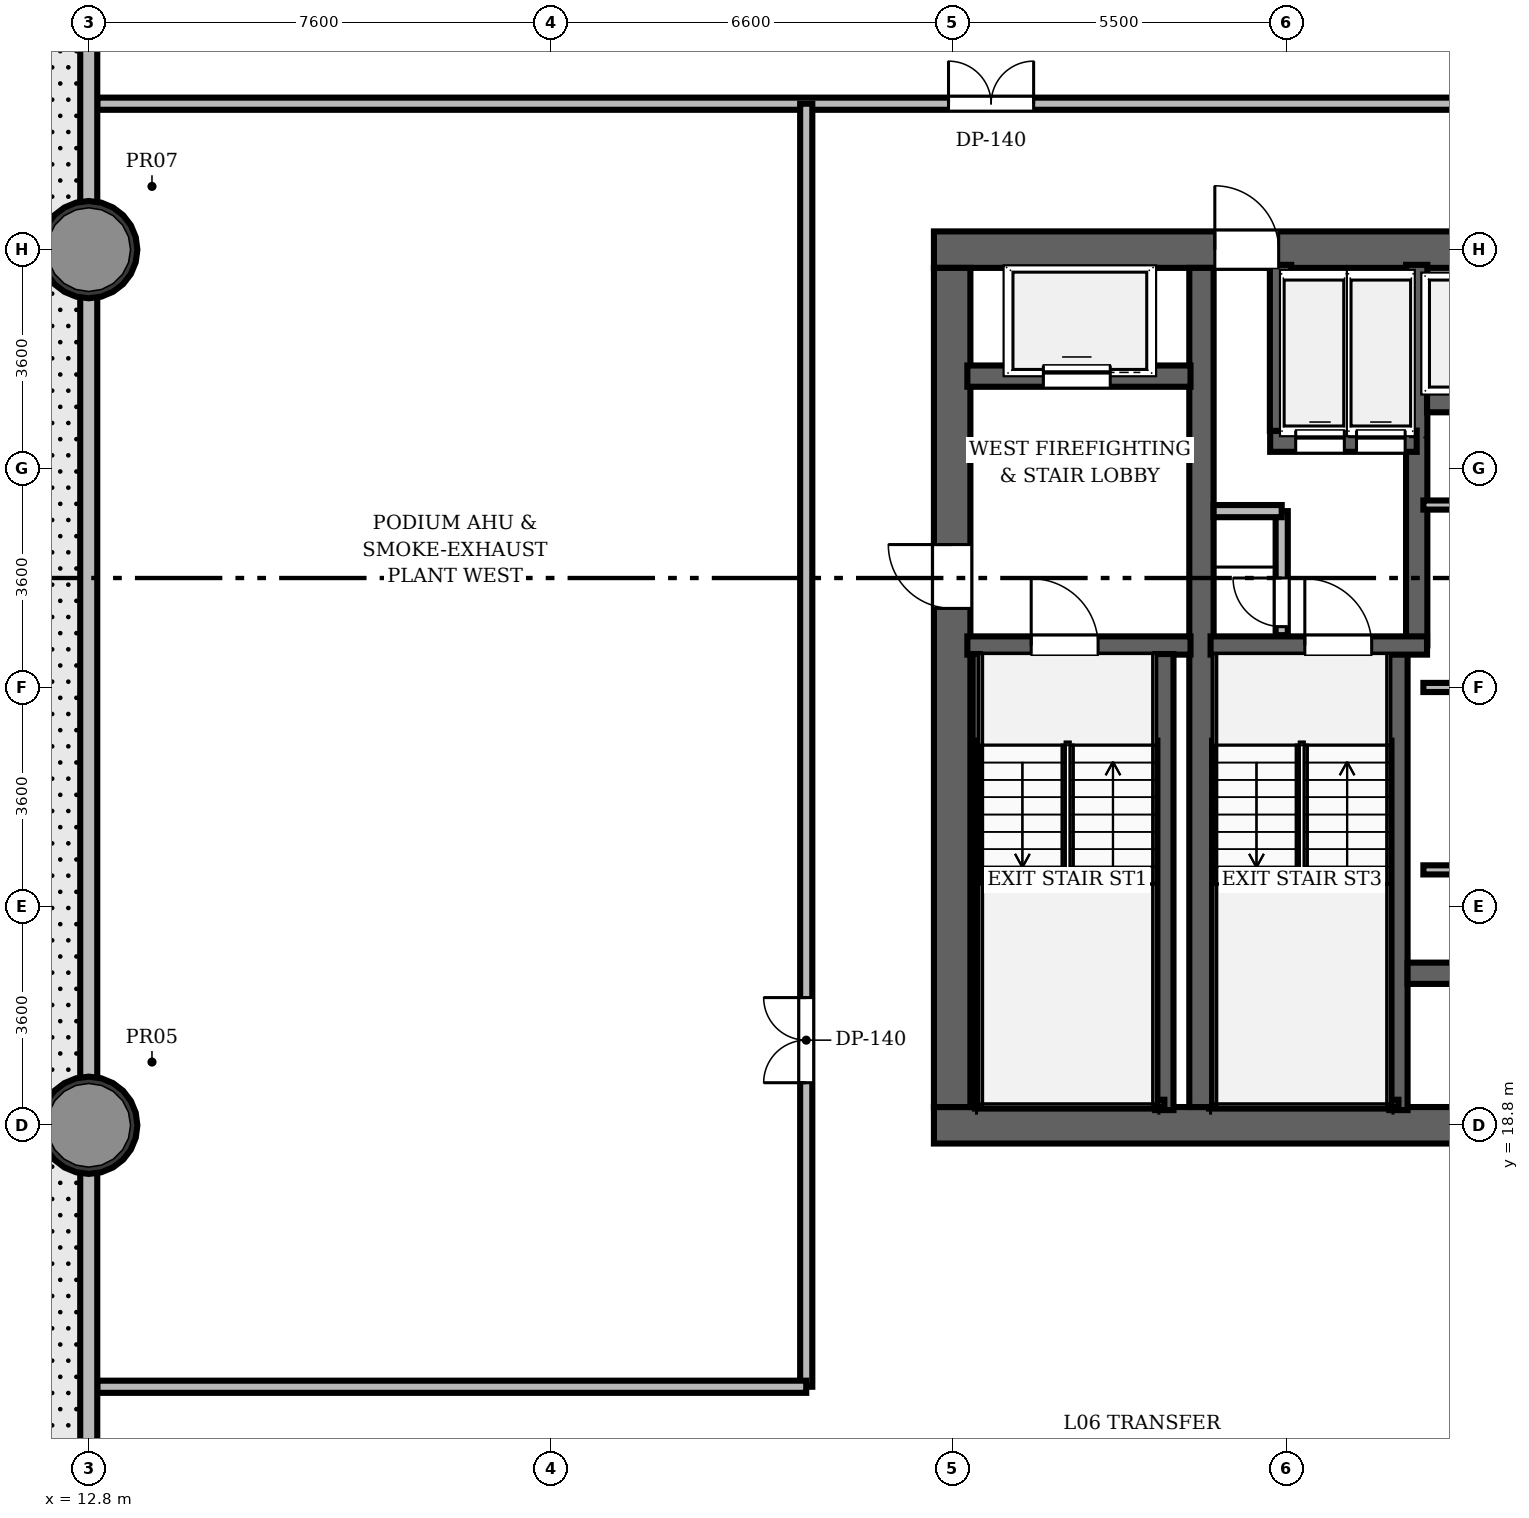
"""IFC4 building model, lengths in metres.
Left out: names, types, materials, properties, quantities, classifications, styles, units other than length and angle.
Written with IfcOpenShell. Run it as: python <this file> out.ifc"""

import sys

from ifc_helpers import new_model, si_unit, direction, frame, frame_2d, origin, origin_2d, place, context, subcontext, project, spatial, rectangle, hollow_circle, extrude, element, fill, save


model = new_model("IFC4")
c1 = context("Model", 3, precision=1e-05, world=origin(), true_north=direction((0.0, 1.0)))
c2 = subcontext(c1, "Body", "Model", "MODEL_VIEW")
j1 = project(units=[si_unit("LENGTHUNIT", "METRE"), si_unit("PLANEANGLEUNIT", "RADIAN")], contexts=[c1])
p1 = place(None, origin())
s1 = spatial("IfcSite", under=j1, at=p1, CompositionType="ELEMENT")
p2 = place(p1, origin())
s2 = spatial("IfcBuilding", under=s1, at=p2, CompositionType="ELEMENT")
p3 = place(p2, frame((0.0, 0.0, 35.4)))
s3 = spatial("IfcBuildingStorey", under=s2, at=p3, CompositionType="ELEMENT", Elevation=35.4)
p4 = place(p3, frame((26.7, 18.8, 0.0), z_axis=(0.0, 0.0, 1.0), x_axis=(1.0, 0.0, 0.0)))
e1 = element("IfcWall", 1, at=p4, inside=s3, PredefinedType="SHEAR", context=c2, shape_type="SweptSolid", body=[
    extrude(rectangle(XDim=22.6, YDim=0.6, at=frame_2d((11.3, 0.0))), origin(), (0.0, 0.0, 1.0), 6.0),
])
p5 = place(p4, frame((14.52, 0.0, 0.0)))
e2 = element("IfcOpeningElement", 2, at=p5, cuts=e1, PredefinedType="OPENING", context=c2, shape_type="SweptSolid", body=[
    extrude(rectangle(XDim=1.05, YDim=2.15, at=frame_2d((0.525, 1.075))), frame((0.0, 0.31, 0.0), z_axis=(0.0, -1.0, 0.0), x_axis=(1.0, 0.0, 0.0)), (0.0, 0.0, 1.0), 0.62),
])
p6 = place(p3, frame((26.7, 33.2, 0.0), z_axis=(0.0, 0.0, 1.0), x_axis=(1.0, 0.0, 0.0)))
e3 = element("IfcWall", 3, at=p6, inside=s3, PredefinedType="SHEAR", context=c2, shape_type="SweptSolid", body=[
    extrude(rectangle(XDim=22.6, YDim=0.6, at=frame_2d((11.3, 0.0))), origin(), (0.0, 0.0, 1.0), 6.0),
])
p7 = place(p6, frame((4.62, 0.0, 0.0)))
e4 = element("IfcOpeningElement", 4, at=p7, cuts=e3, PredefinedType="OPENING", context=c2, shape_type="SweptSolid", body=[
    extrude(rectangle(XDim=1.05, YDim=2.15, at=frame_2d((0.525, 1.075))), frame((0.0, 0.31, 0.0), z_axis=(0.0, -1.0, 0.0), x_axis=(1.0, 0.0, 0.0)), (0.0, 0.0, 1.0), 0.62),
])
p8 = place(p6, frame((14.52, 0.0, 0.0)))
e5 = element("IfcOpeningElement", 5, at=p8, cuts=e3, PredefinedType="OPENING", context=c2, shape_type="SweptSolid", body=[
    extrude(rectangle(XDim=1.05, YDim=2.15, at=frame_2d((0.525, 1.075))), frame((0.0, 0.31, 0.0), z_axis=(0.0, -1.0, 0.0), x_axis=(1.0, 0.0, 0.0)), (0.0, 0.0, 1.0), 0.62),
])
p9 = place(p3, frame((27.0, 19.1, 0.0), z_axis=(0.0, 0.0, 1.0), x_axis=(0.0, 1.0, 0.0)))
e6 = element("IfcWall", 6, at=p9, inside=s3, PredefinedType="SHEAR", context=c2, shape_type="SweptSolid", body=[
    extrude(rectangle(XDim=13.8, YDim=0.6, at=frame_2d((6.9, 0.0))), origin(), (0.0, 0.0, 1.0), 6.0),
])
p10 = place(p9, frame((8.2, 0.0, 0.0)))
e7 = element("IfcOpeningElement", 7, at=p10, cuts=e6, PredefinedType="OPENING", context=c2, shape_type="SweptSolid", body=[
    extrude(rectangle(XDim=1.05, YDim=2.15, at=frame_2d((0.525, 1.075))), frame((0.0, 0.31, 0.0), z_axis=(0.0, -1.0, 0.0), x_axis=(1.0, 0.0, 0.0)), (0.0, 0.0, 1.0), 0.62),
])
p11 = place(p3, frame((31.1, 19.1, 0.0), z_axis=(0.0, 0.0, 1.0), x_axis=(0.0, 1.0, 0.0)))
e8 = element("IfcWall", 8, at=p11, inside=s3, PredefinedType="SHEAR", context=c2, shape_type="SweptSolid", body=[
    extrude(rectangle(XDim=13.8, YDim=0.4, at=frame_2d((6.9, 0.0))), origin(), (0.0, 0.0, 1.0), 6.0),
])
for number, where, z_axis, x_axis in (
    (9, (12.8, 18.8, 0.0), (0.0, 0.0, 1.0), (1.0, 0.0, 0.0)),
    (10, (12.8, 33.2, 0.0), (0.0, 0.0, 1.0), (1.0, 0.0, 0.0)),
):
    element("IfcColumn", number, at=place(p3, frame(where, z_axis=z_axis, x_axis=x_axis)), inside=s3, PredefinedType="COLUMN", context=c2, shape_type="SweptSolid", body=[
        extrude(hollow_circle(Radius=0.8, WallThickness=0.06, at=origin_2d()), origin(), (0.0, 0.0, 1.0), 6.0),
    ])
p12 = place(p3, frame((27.25, 26.69, 0.0), z_axis=(0.0, 0.0, 1.0), x_axis=(1.0, 0.0, 0.0)))
e11 = element("IfcWall", 11, at=p12, inside=s3, PredefinedType="SHEAR", context=c2, shape_type="SweptSolid", body=[
    extrude(rectangle(XDim=3.67, YDim=0.3, at=frame_2d((1.835, 0.0))), origin(), (0.0, 0.0, 1.0), 6.0),
])
p13 = place(p12, frame((1.05, 0.0, 0.0)))
e12 = element("IfcOpeningElement", 12, at=p13, cuts=e11, PredefinedType="OPENING", context=c2, shape_type="SweptSolid", body=[
    extrude(rectangle(XDim=1.1, YDim=2.15, at=frame_2d((0.55, 1.075))), frame((0.0, 0.16, 0.0), z_axis=(0.0, -1.0, 0.0), x_axis=(1.0, 0.0, 0.0)), (0.0, 0.0, 1.0), 0.32),
])
p14 = place(p3, frame((30.49, 19.05, 0.0), z_axis=(0.0, 0.0, 1.0), x_axis=(0.0, 1.0, 0.0)))
e13 = element("IfcWall", 13, at=p14, inside=s3, PredefinedType="SHEAR", context=c2, shape_type="SweptSolid", body=[
    extrude(rectangle(XDim=7.5, YDim=0.3, at=frame_2d((3.75, 0.0))), origin(), (0.0, 0.0, 1.0), 6.0),
])
p15 = place(p3, frame((27.395, 19.1, 0.0), z_axis=(0.0, 0.0, 1.0), x_axis=(0.0, 1.0, 0.0)))
e14 = element("IfcWall", 14, at=p15, inside=s3, PredefinedType="SHEAR", context=c2, shape_type="SweptSolid", body=[
    extrude(rectangle(XDim=7.45, YDim=0.12, at=frame_2d((3.725, 0.0))), origin(), (0.0, 0.0, 1.0), 6.0),
])
p16 = place(p3, frame((27.395, 19.16, 0.0), z_axis=(0.0, 0.0, 1.0), x_axis=(1.0, 0.0, 0.0)))
e15 = element("IfcWall", 15, at=p16, inside=s3, PredefinedType="SHEAR", context=c2, shape_type="SweptSolid", body=[
    extrude(rectangle(XDim=3.095, YDim=0.12, at=frame_2d((1.547, 0.0))), origin(), (0.0, 0.0, 1.0), 6.0),
])
p17 = place(p3, frame((27.25, 31.12, 0.0), z_axis=(0.0, 0.0, 1.0), x_axis=(1.0, 0.0, 0.0)))
e16 = element("IfcWall", 16, at=p17, inside=s3, PredefinedType="SHEAR", context=c2, shape_type="SweptSolid", body=[
    extrude(rectangle(XDim=3.67, YDim=0.35, at=frame_2d((1.835, 0.0))), origin(), (0.0, 0.0, 1.0), 4.81),
])
p18 = place(p17, frame((1.25, 0.0, 0.0)))
e17 = element("IfcOpeningElement", 17, at=p18, cuts=e16, PredefinedType="OPENING", context=c2, shape_type="SweptSolid", body=[
    extrude(rectangle(XDim=1.1, YDim=2.15, at=frame_2d((0.55, 1.075))), frame((0.0, 0.185, 0.0), z_axis=(0.0, -1.0, 0.0), x_axis=(1.0, 0.0, 0.0)), (0.0, 0.0, 1.0), 0.37),
])
p19 = place(p3, frame((34.34, 19.05, 0.0), z_axis=(0.0, 0.0, 1.0), x_axis=(0.0, 1.0, 0.0)))
e18 = element("IfcWall", 18, at=p19, inside=s3, PredefinedType="SHEAR", context=c2, shape_type="SweptSolid", body=[
    extrude(rectangle(XDim=7.5, YDim=0.3, at=frame_2d((3.75, 0.0))), origin(), (0.0, 0.0, 1.0), 6.0),
])
p20 = place(p3, frame((34.64, 26.69, 0.0), z_axis=(0.0, 0.0, 1.0), x_axis=(0.0, 1.0, 0.0)))
e19 = element("IfcWall", 19, at=p20, inside=s3, PredefinedType="SHEAR", context=c2, shape_type="SweptSolid", body=[
    extrude(rectangle(XDim=6.26, YDim=0.35, at=frame_2d((3.13, 0.0))), origin(), (0.0, 0.0, 1.0), 6.0),
])
p21 = place(p3, frame((31.25, 26.69, 0.0), z_axis=(0.0, 0.0, 1.0), x_axis=(1.0, 0.0, 0.0)))
e20 = element("IfcWall", 20, at=p21, inside=s3, PredefinedType="SHEAR", context=c2, shape_type="SweptSolid", body=[
    extrude(rectangle(XDim=3.56, YDim=0.3, at=frame_2d((1.78, 0.0))), origin(), (0.0, 0.0, 1.0), 6.0),
])
p22 = place(p21, frame((1.55, 0.0, 0.0)))
e21 = element("IfcOpeningElement", 21, at=p22, cuts=e20, PredefinedType="OPENING", context=c2, shape_type="SweptSolid", body=[
    extrude(rectangle(XDim=1.1, YDim=2.15, at=frame_2d((0.55, 1.075))), frame((0.0, 0.16, 0.0), z_axis=(0.0, -1.0, 0.0), x_axis=(1.0, 0.0, 0.0)), (0.0, 0.0, 1.0), 0.32),
])
p23 = place(p3, frame((31.3, 19.16, 0.0), z_axis=(0.0, 0.0, 1.0), x_axis=(1.0, 0.0, 0.0)))
e22 = element("IfcWall", 22, at=p23, inside=s3, PredefinedType="SHEAR", context=c2, shape_type="SweptSolid", body=[
    extrude(rectangle(XDim=3.04, YDim=0.12, at=frame_2d((1.52, 0.0))), origin(), (0.0, 0.0, 1.0), 6.0),
])
p24 = place(p3, frame((32.23, 30.05, 0.0), z_axis=(0.0, 0.0, 1.0), x_axis=(1.0, 0.0, 0.0)))
e23 = element("IfcWall", 23, at=p24, inside=s3, PredefinedType="SHEAR", context=c2, shape_type="SweptSolid", body=[
    extrude(rectangle(XDim=2.41, YDim=0.35, at=frame_2d((1.205, 0.0))), origin(), (0.0, 0.0, 1.0), 4.81),
])
p25 = place(p24, frame((0.42, 0.0, 0.0)))
e24 = element("IfcOpeningElement", 24, at=p25, cuts=e23, PredefinedType="OPENING", context=c2, shape_type="SweptSolid", body=[
    extrude(rectangle(XDim=0.8, YDim=2.15, at=frame_2d((0.4, 1.075))), frame((0.0, 0.185, 0.0), z_axis=(0.0, -1.0, 0.0), x_axis=(1.0, 0.0, 0.0)), (0.0, 0.0, 1.0), 0.37),
])
p26 = place(p24, frame((1.42, 0.0, 0.0)))
e25 = element("IfcOpeningElement", 25, at=p26, cuts=e23, PredefinedType="OPENING", context=c2, shape_type="SweptSolid", body=[
    extrude(rectangle(XDim=0.8, YDim=2.15, at=frame_2d((0.4, 1.075))), frame((0.0, 0.185, 0.0), z_axis=(0.0, -1.0, 0.0), x_axis=(1.0, 0.0, 0.0)), (0.0, 0.0, 1.0), 0.37),
])
p27 = place(p3, frame((32.4, 30.22, 0.0), z_axis=(0.0, 0.0, 1.0), x_axis=(0.0, 1.0, 0.0)))
e26 = element("IfcWall", 26, at=p27, inside=s3, PredefinedType="SHEAR", context=c2, shape_type="SweptSolid", body=[
    extrude(rectangle(XDim=2.73, YDim=0.35, at=frame_2d((1.365, 0.0))), origin(), (0.0, 0.0, 1.0), 4.81),
])
p28 = place(p3, frame((32.42, 26.86, 0.0), z_axis=(0.0, 0.0, 1.0), x_axis=(0.0, 1.0, 0.0)))
e27 = element("IfcWall", 27, at=p28, inside=s3, PredefinedType="PARTITIONING", context=c2, shape_type="SweptSolid", body=[
    extrude(rectangle(XDim=2.04, YDim=0.2, at=frame_2d((1.02, 0.0))), origin(), (0.0, 0.0, 1.0), 4.81),
])
p29 = place(p28, frame((0.14, 0.0, 0.0)))
e28 = element("IfcOpeningElement", 28, at=p29, cuts=e27, PredefinedType="OPENING", context=c2, shape_type="SweptSolid", body=[
    extrude(rectangle(XDim=0.8, YDim=2.05, at=frame_2d((0.4, 1.025))), frame((0.0, 0.11, 0.0), z_axis=(0.0, -1.0, 0.0), x_axis=(1.0, 0.0, 0.0)), (0.0, 0.0, 1.0), 0.22),
])
p30 = place(p3, frame((31.3, 28.9, 0.0), z_axis=(0.0, 0.0, 1.0), x_axis=(1.0, 0.0, 0.0)))
e29 = element("IfcWall", 29, at=p30, inside=s3, PredefinedType="PARTITIONING", context=c2, shape_type="SweptSolid", body=[
    extrude(rectangle(XDim=1.12, YDim=0.2, at=frame_2d((0.56, 0.0))), origin(), (0.0, 0.0, 1.0), 4.81),
])
p31 = place(p3, frame((34.81, 30.7, 0.0), z_axis=(0.0, 0.0, 1.0), x_axis=(1.0, 0.0, 0.0)))
e30 = element("IfcWall", 30, at=p31, inside=s3, PredefinedType="SHEAR", context=c2, shape_type="SweptSolid", body=[
    extrude(rectangle(XDim=6.36, YDim=0.35, at=frame_2d((3.18, 0.0))), origin(), (0.0, 0.0, 1.0), 4.81),
])
p32 = place(p31, frame((0.5, 0.0, 0.0)))
e31 = element("IfcOpeningElement", 31, at=p32, cuts=e30, PredefinedType="OPENING", context=c2, shape_type="SweptSolid", body=[
    extrude(rectangle(XDim=0.9, YDim=2.15, at=frame_2d((0.45, 1.075))), frame((0.0, 0.185, 0.0), z_axis=(0.0, -1.0, 0.0), x_axis=(1.0, 0.0, 0.0)), (0.0, 0.0, 1.0), 0.37),
])
p33 = place(p31, frame((2.58, 0.0, 0.0)))
e32 = element("IfcOpeningElement", 32, at=p33, cuts=e30, PredefinedType="OPENING", context=c2, shape_type="SweptSolid", body=[
    extrude(rectangle(XDim=0.9, YDim=2.15, at=frame_2d((0.45, 1.075))), frame((0.0, 0.185, 0.0), z_axis=(0.0, -1.0, 0.0), x_axis=(1.0, 0.0, 0.0)), (0.0, 0.0, 1.0), 0.37),
])
p34 = place(p31, frame((4.66, 0.0, 0.0)))
e33 = element("IfcOpeningElement", 33, at=p34, cuts=e30, PredefinedType="OPENING", context=c2, shape_type="SweptSolid", body=[
    extrude(rectangle(XDim=0.9, YDim=2.15, at=frame_2d((0.45, 1.075))), frame((0.0, 0.185, 0.0), z_axis=(0.0, -1.0, 0.0), x_axis=(1.0, 0.0, 0.0)), (0.0, 0.0, 1.0), 0.37),
])
p35 = place(p3, frame((34.49, 21.3, 0.0), z_axis=(0.0, 0.0, 1.0), x_axis=(1.0, 0.0, 0.0)))
e34 = element("IfcWall", 34, at=p35, inside=s3, PredefinedType="SHEAR", context=c2, shape_type="SweptSolid", body=[
    extrude(rectangle(XDim=6.68, YDim=0.35, at=frame_2d((3.34, 0.0))), origin(), (0.0, 0.0, 1.0), 4.81),
])
for number, where, z_axis, x_axis in (
    (35, (34.75, 29.0, 0.0), (0.0, 0.0, 1.0), (1.0, 0.0, 0.0)),
    (36, (34.75, 23.0, 0.0), (0.0, 0.0, 1.0), (1.0, 0.0, 0.0)),
    (37, (34.75, 26.0, 0.0), (0.0, 0.0, 1.0), (1.0, 0.0, 0.0)),
):
    element("IfcWall", number, at=place(p3, frame(where, z_axis=z_axis, x_axis=x_axis)), inside=s3, PredefinedType="PARTITIONING", context=c2, shape_type="SweptSolid", body=[
        extrude(rectangle(XDim=6.25, YDim=0.15, at=frame_2d((3.125, 0.0))), origin(), (0.0, 0.0, 1.0), 4.81),
    ])
p36 = place(p3, frame((12.94, 35.6, 0.0), z_axis=(0.0, 0.0, 1.0), x_axis=(1.0, 0.0, 0.0)))
e38 = element("IfcWall", 38, at=p36, inside=s3, PredefinedType="PARTITIONING", context=c2, shape_type="SweptSolid", body=[
    extrude(rectangle(XDim=50.12, YDim=0.2, at=frame_2d((25.06, 0.0))), origin(), (0.0, 0.0, 1.0), 4.81),
])
p37 = place(p36, frame((14.0, 0.0, 0.0)))
e39 = element("IfcOpeningElement", 39, at=p37, cuts=e38, PredefinedType="OPENING", context=c2, shape_type="SweptSolid", body=[
    extrude(rectangle(XDim=1.4, YDim=2.25, at=frame_2d((0.7, 1.125))), frame((0.0, 0.11, 0.0), z_axis=(0.0, -1.0, 0.0), x_axis=(1.0, 0.0, 0.0)), (0.0, 0.0, 1.0), 0.22),
])
p38 = place(p36, frame((31.0, 0.0, 0.0)))
e40 = element("IfcOpeningElement", 40, at=p38, cuts=e38, PredefinedType="OPENING", context=c2, shape_type="SweptSolid", body=[
    extrude(rectangle(XDim=1.4, YDim=2.25, at=frame_2d((0.7, 1.125))), frame((0.0, 0.11, 0.0), z_axis=(0.0, -1.0, 0.0), x_axis=(1.0, 0.0, 0.0)), (0.0, 0.0, 1.0), 0.22),
])
p39 = place(p3, frame((24.6, 14.5, 0.0), z_axis=(0.0, 0.0, 1.0), x_axis=(0.0, 1.0, 0.0)))
e41 = element("IfcWall", 41, at=p39, inside=s3, PredefinedType="PARTITIONING", context=c2, shape_type="SweptSolid", body=[
    extrude(rectangle(XDim=21.1, YDim=0.2, at=frame_2d((10.55, 0.0))), origin(), (0.0, 0.0, 1.0), 4.81),
])
p40 = place(p39, frame((5.0, 0.0, 0.0)))
e42 = element("IfcOpeningElement", 42, at=p40, cuts=e41, PredefinedType="OPENING", context=c2, shape_type="SweptSolid", body=[
    extrude(rectangle(XDim=1.4, YDim=2.25, at=frame_2d((0.7, 1.125))), frame((0.0, 0.11, 0.0), z_axis=(0.0, -1.0, 0.0), x_axis=(1.0, 0.0, 0.0)), (0.0, 0.0, 1.0), 0.22),
])
p41 = place(p3, frame((12.94, 14.5, 0.0), z_axis=(0.0, 0.0, 1.0), x_axis=(1.0, 0.0, 0.0)))
e43 = element("IfcWall", 43, at=p41, inside=s3, PredefinedType="PARTITIONING", context=c2, shape_type="SweptSolid", body=[
    extrude(rectangle(XDim=11.66, YDim=0.2, at=frame_2d((5.83, 0.0))), origin(), (0.0, 0.0, 1.0), 4.81),
])
p42 = place(p3, frame((12.8, 8.34, 0.0), z_axis=(0.0, 0.0, 1.0), x_axis=(0.0, 1.0, 0.0)))
e44 = element("IfcWall", 44, at=p42, inside=s3, PredefinedType="SOLIDWALL", context=c2, shape_type="SweptSolid", body=[
    extrude(rectangle(XDim=35.32, YDim=0.28, at=frame_2d((17.66, 0.0))), origin(), (0.0, 0.0, 1.0), 5.0),
])
p43 = place(p13, origin())
e45 = element("IfcDoor", 45, at=p43, inside=s3, OperationType="SINGLE_SWING_LEFT", PredefinedType="DOOR", context=c2, shape_type="SweptSolid", body=[
    extrude(rectangle(XDim=1.1, YDim=2.15, at=frame_2d((0.55, 1.075))), frame((0.0, 0.025, 0.0), z_axis=(0.0, -1.0, 0.0), x_axis=(1.0, 0.0, 0.0)), (0.0, 0.0, 1.0), 0.05),
])
fill(e12, e45)
p44 = place(p10, origin())
e46 = element("IfcDoor", 46, at=p44, inside=s3, OperationType="SINGLE_SWING_RIGHT", PredefinedType="DOOR", context=c2, shape_type="SweptSolid", body=[
    extrude(rectangle(XDim=1.05, YDim=2.15, at=frame_2d((0.525, 1.075))), frame((0.0, 0.025, 0.0), z_axis=(0.0, -1.0, 0.0), x_axis=(1.0, 0.0, 0.0)), (0.0, 0.0, 1.0), 0.05),
])
fill(e7, e46)
p45 = place(p22, origin())
e47 = element("IfcDoor", 47, at=p45, inside=s3, OperationType="SINGLE_SWING_LEFT", PredefinedType="DOOR", context=c2, shape_type="SweptSolid", body=[
    extrude(rectangle(XDim=1.1, YDim=2.15, at=frame_2d((0.55, 1.075))), frame((0.0, 0.025, 0.0), z_axis=(0.0, -1.0, 0.0), x_axis=(1.0, 0.0, 0.0)), (0.0, 0.0, 1.0), 0.05),
])
fill(e21, e47)
p46 = place(p29, origin())
e48 = element("IfcDoor", 48, at=p46, inside=s3, OperationType="SINGLE_SWING_RIGHT", PredefinedType="DOOR", context=c2, shape_type="SweptSolid", body=[
    extrude(rectangle(XDim=0.8, YDim=2.05, at=frame_2d((0.4, 1.025))), frame((0.0, 0.025, 0.0), z_axis=(0.0, -1.0, 0.0), x_axis=(1.0, 0.0, 0.0)), (0.0, 0.0, 1.0), 0.05),
])
fill(e28, e48)
p47 = place(p7, origin())
e49 = element("IfcDoor", 49, at=p47, inside=s3, OperationType="SINGLE_SWING_LEFT", PredefinedType="DOOR", context=c2, shape_type="SweptSolid", body=[
    extrude(rectangle(XDim=1.05, YDim=2.15, at=frame_2d((0.525, 1.075))), frame((0.0, 0.025, 0.0), z_axis=(0.0, -1.0, 0.0), x_axis=(1.0, 0.0, 0.0)), (0.0, 0.0, 1.0), 0.05),
])
fill(e4, e49)
p48 = place(p40, origin())
e50 = element("IfcDoor", 50, at=p48, inside=s3, OperationType="DOUBLE_DOOR_SINGLE_SWING", PredefinedType="DOOR", context=c2, shape_type="SweptSolid", body=[
    extrude(rectangle(XDim=1.4, YDim=2.25, at=frame_2d((0.7, 1.125))), frame((0.0, 0.025, 0.0), z_axis=(0.0, -1.0, 0.0), x_axis=(1.0, 0.0, 0.0)), (0.0, 0.0, 1.0), 0.05),
])
fill(e42, e50)
p49 = place(p37, origin())
e51 = element("IfcDoor", 51, at=p49, inside=s3, OperationType="DOUBLE_DOOR_SINGLE_SWING", PredefinedType="DOOR", context=c2, shape_type="SweptSolid", body=[
    extrude(rectangle(XDim=1.4, YDim=2.25, at=frame_2d((0.7, 1.125))), frame((0.0, 0.025, 0.0), z_axis=(0.0, -1.0, 0.0), x_axis=(1.0, 0.0, 0.0)), (0.0, 0.0, 1.0), 0.05),
])
fill(e39, e51)
p50 = place(p18, origin())
e52 = element("IfcDoor", 52, at=p50, inside=s3, OperationType="SLIDING_TO_LEFT", PredefinedType="DOOR", context=c2, shape_type="SweptSolid", body=[
    extrude(rectangle(XDim=1.1, YDim=2.15, at=frame_2d((0.55, 1.075))), frame((0.0, 0.025, 0.0), z_axis=(0.0, -1.0, 0.0), x_axis=(1.0, 0.0, 0.0)), (0.0, 0.0, 1.0), 0.05),
])
fill(e17, e52)
p51 = place(p25, origin())
e53 = element("IfcDoor", 53, at=p51, inside=s3, OperationType="SLIDING_TO_LEFT", PredefinedType="DOOR", context=c2, shape_type="SweptSolid", body=[
    extrude(rectangle(XDim=0.8, YDim=2.15, at=frame_2d((0.4, 1.075))), frame((0.0, 0.025, 0.0), z_axis=(0.0, -1.0, 0.0), x_axis=(1.0, 0.0, 0.0)), (0.0, 0.0, 1.0), 0.05),
])
fill(e24, e53)
p52 = place(p26, origin())
e54 = element("IfcDoor", 54, at=p52, inside=s3, OperationType="SLIDING_TO_LEFT", PredefinedType="DOOR", context=c2, shape_type="SweptSolid", body=[
    extrude(rectangle(XDim=0.8, YDim=2.15, at=frame_2d((0.4, 1.075))), frame((0.0, 0.025, 0.0), z_axis=(0.0, -1.0, 0.0), x_axis=(1.0, 0.0, 0.0)), (0.0, 0.0, 1.0), 0.05),
])
fill(e25, e54)
save(model, sys.argv[1])
